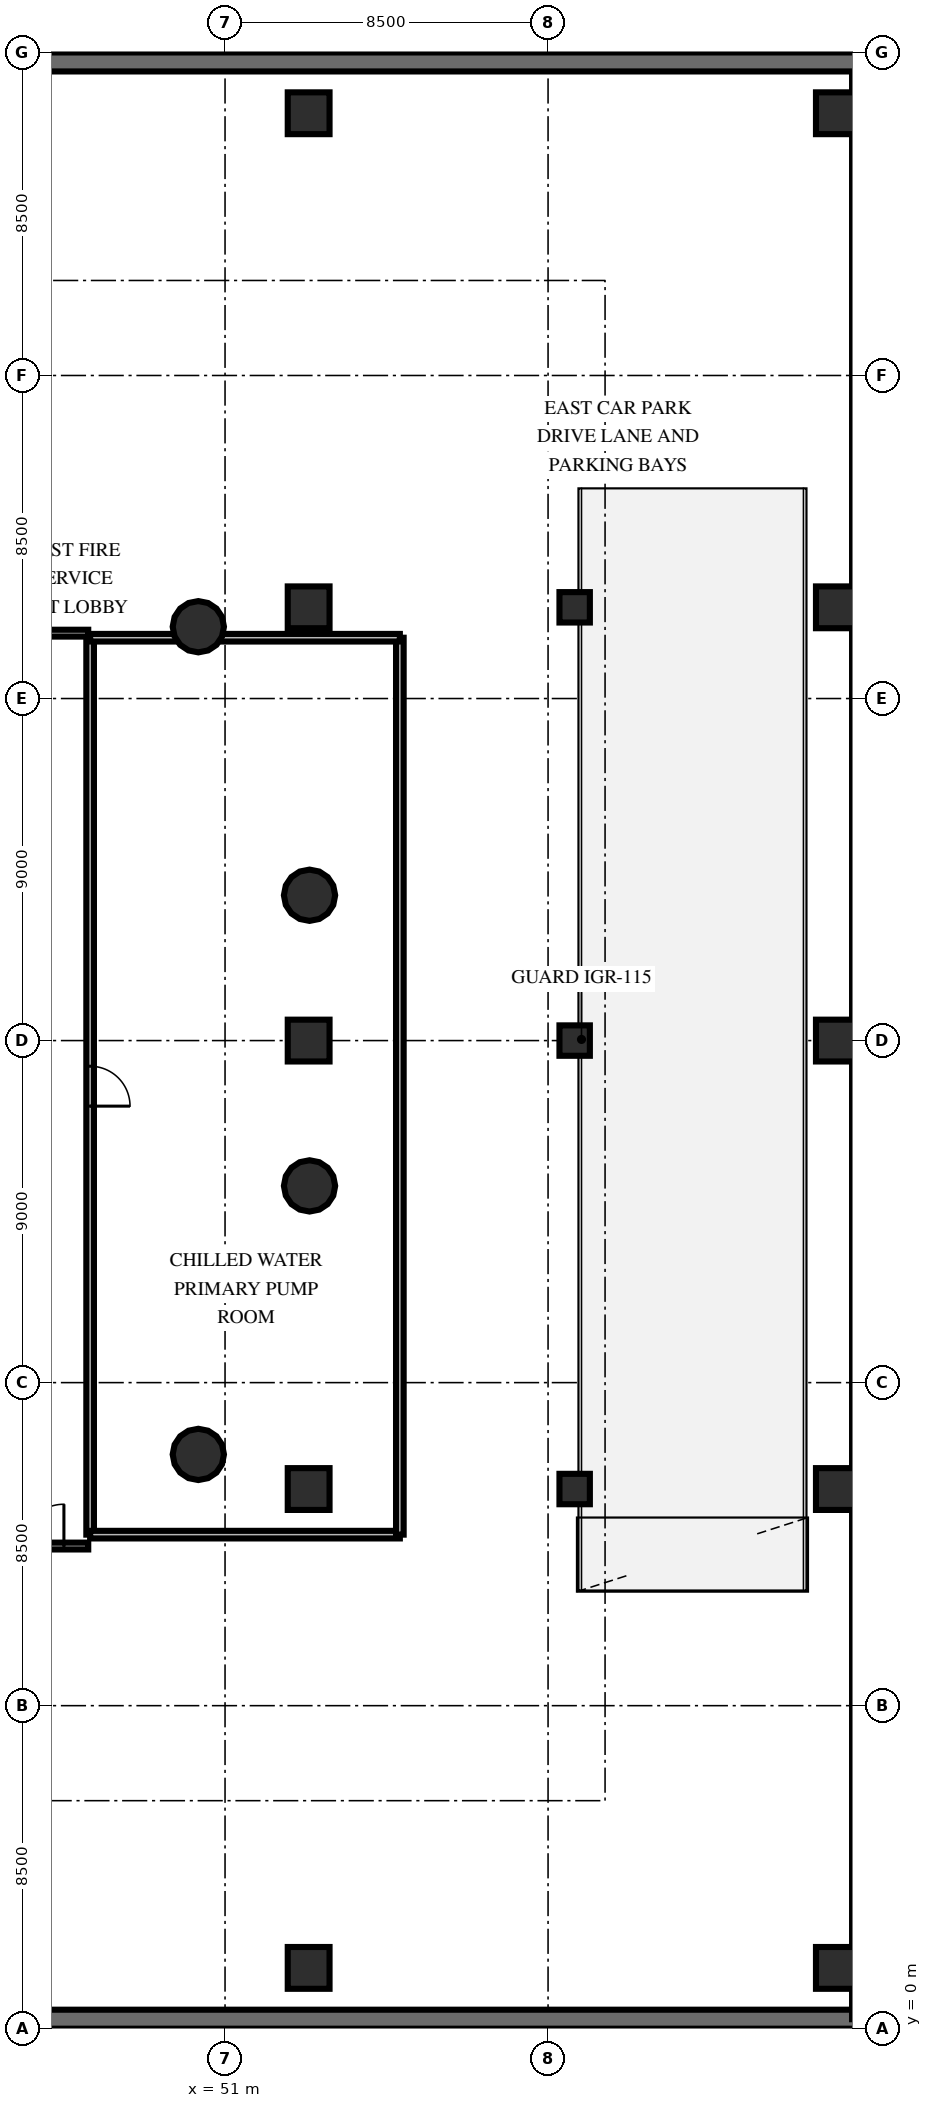
"""IFC4 building model, lengths in metres.
Left out: names, types, materials, properties, quantities, classifications, styles, units other than length and angle.
Written with IfcOpenShell. Run it as: python <this file> out.ifc"""

import sys

from ifc_helpers import new_model, si_unit, direction, frame, frame_2d, origin, origin_2d, place, context, subcontext, project, spatial, rectangle, circle, extrude, element, fill, save


model = new_model("IFC4")
c1 = context("Model", 3, precision=1e-05, world=origin(), true_north=direction((0.0, 1.0)))
c2 = subcontext(c1, "Body", "Model", "MODEL_VIEW")
j1 = project(units=[si_unit("LENGTHUNIT", "METRE"), si_unit("PLANEANGLEUNIT", "RADIAN")], contexts=[c1])
p1 = place(None, origin())
s1 = spatial("IfcSite", under=j1, at=p1, CompositionType="ELEMENT")
p2 = place(p1, origin())
s2 = spatial("IfcBuilding", under=s1, at=p2, CompositionType="ELEMENT")
p3 = place(p2, frame((0.0, 0.0, -9.6)))
s3 = spatial("IfcBuildingStorey", under=s2, at=p3, CompositionType="ELEMENT", Elevation=-9.6)
for number, where, z_axis, x_axis in (
    (1, (0.25, 0.25, 0.0), (0.0, 0.0, 1.0), (1.0, 0.0, 0.0)),
    (2, (67.75, 51.75, 0.0), (0.0, 0.0, 1.0), (-1.0, 0.0, 0.0)),
):
    element("IfcWall", number, at=place(p3, frame(where, z_axis=z_axis, x_axis=x_axis)), inside=s3, PredefinedType="SOLIDWALL", context=c2, shape_type="SweptSolid", body=[
        extrude(rectangle(XDim=67.5, YDim=0.5, at=frame_2d((33.75, 0.0))), origin(), (0.0, 0.0, 1.0), 4.8),
    ])
for number, where, z_axis, x_axis in (
    (3, (53.2, 1.6, 0.0), (0.0, 0.0, 1.0), (1.0, 0.0, 0.0)),
    (4, (53.2, 14.2, 0.0), (0.0, 0.0, 1.0), (1.0, 0.0, 0.0)),
    (5, (53.2, 26.0, 0.0), (0.0, 0.0, 1.0), (1.0, 0.0, 0.0)),
    (6, (53.2, 37.4, 0.0), (0.0, 0.0, 1.0), (1.0, 0.0, 0.0)),
    (7, (53.2, 50.4, 0.0), (0.0, 0.0, 1.0), (1.0, 0.0, 0.0)),
    (8, (67.1, 1.6, 0.0), (0.0, 0.0, 1.0), (1.0, 0.0, 0.0)),
    (9, (67.1, 14.2, 0.0), (0.0, 0.0, 1.0), (1.0, 0.0, 0.0)),
    (10, (67.1, 26.0, 0.0), (0.0, 0.0, 1.0), (1.0, 0.0, 0.0)),
    (11, (67.1, 37.4, 0.0), (0.0, 0.0, 1.0), (1.0, 0.0, 0.0)),
    (12, (67.1, 50.4, 0.0), (0.0, 0.0, 1.0), (1.0, 0.0, 0.0)),
):
    element("IfcColumn", number, at=place(p3, frame(where, z_axis=z_axis, x_axis=x_axis)), inside=s3, PredefinedType="COLUMN", context=c2, shape_type="SweptSolid", body=[
        extrude(rectangle(XDim=1.1, YDim=1.1, at=origin_2d()), origin(), (0.0, 0.0, 1.0), 4.8),
    ])
for number, where, z_axis, x_axis in (
    (13, (53.223, 29.824, 0.0), (0.0, 0.0, 1.0), (1.0, 0.0, 0.0)),
    (14, (50.297, 36.889, 0.0), (0.0, 0.0, 1.0), (1.0, 0.0, 0.0)),
    (15, (50.297, 15.111, 0.0), (0.0, 0.0, 1.0), (1.0, 0.0, 0.0)),
    (16, (53.223, 22.176, 0.0), (0.0, 0.0, 1.0), (1.0, 0.0, 0.0)),
):
    element("IfcColumn", number, at=place(p3, frame(where, z_axis=z_axis, x_axis=x_axis)), inside=s3, PredefinedType="COLUMN", context=c2, shape_type="SweptSolid", body=[
        extrude(circle(Radius=0.675, at=origin_2d()), origin(), (0.0, 0.0, 1.0), 4.8),
    ])
for number, where, z_axis, x_axis in (
    (17, (60.2, 14.2, 0.0), (0.0, 0.0, 1.0), (1.0, 0.0, 0.0)),
    (18, (60.2, 26.0, 0.0), (0.0, 0.0, 1.0), (1.0, 0.0, 0.0)),
    (19, (60.2, 37.4, 0.0), (0.0, 0.0, 1.0), (1.0, 0.0, 0.0)),
):
    element("IfcColumn", number, at=place(p3, frame(where, z_axis=z_axis, x_axis=x_axis)), inside=s3, PredefinedType="COLUMN", context=c2, shape_type="SweptSolid", body=[
        extrude(rectangle(XDim=0.8, YDim=0.8, at=origin_2d()), origin(), (0.0, 0.0, 1.0), 4.8),
    ])
p4 = place(p3, frame((11.95, 36.72, 0.0), z_axis=(0.0, 0.0, 1.0), x_axis=(1.0, 0.0, 0.0)))
e20 = element("IfcWall", 20, at=p4, inside=s3, PredefinedType="PARTITIONING", context=c2, shape_type="SweptSolid", body=[
    extrude(rectangle(XDim=35.45, YDim=0.18, at=frame_2d((17.725, 0.0))), origin(), (0.0, 0.0, 1.0), 3.56),
])
p5 = place(p4, frame((6.5, 0.0, 0.0)))
e21 = element("IfcOpeningElement", 21, at=p5, cuts=e20, PredefinedType="OPENING", context=c2, shape_type="SweptSolid", body=[
    extrude(rectangle(XDim=1.1, YDim=2.15, at=frame_2d((0.55, 1.075))), frame((0.0, 0.1, 0.0), z_axis=(0.0, -1.0, 0.0), x_axis=(1.0, 0.0, 0.0)), (0.0, 0.0, 1.0), 0.2),
])
p6 = place(p3, frame((45.01, 12.7, 0.0), z_axis=(0.0, 0.0, 1.0), x_axis=(1.0, 0.0, 0.0)))
e22 = element("IfcWall", 22, at=p6, inside=s3, PredefinedType="PARTITIONING", context=c2, shape_type="SweptSolid", body=[
    extrude(rectangle(XDim=2.39, YDim=0.18, at=frame_2d((1.195, 0.0))), origin(), (0.0, 0.0, 1.0), 3.56),
])
p7 = place(p6, frame((0.65, 0.0, 0.0)))
e23 = element("IfcOpeningElement", 23, at=p7, cuts=e22, PredefinedType="OPENING", context=c2, shape_type="SweptSolid", body=[
    extrude(rectangle(XDim=1.1, YDim=2.15, at=frame_2d((0.55, 1.075))), frame((0.0, 0.1, 0.0), z_axis=(0.0, -1.0, 0.0), x_axis=(1.0, 0.0, 0.0)), (0.0, 0.0, 1.0), 0.2),
])
p8 = place(p3, frame((47.45, 36.6, 0.0), z_axis=(0.0, 0.0, 1.0), x_axis=(0.0, -1.0, 0.0)))
e24 = element("IfcWall", 24, at=p8, inside=s3, PredefinedType="SOLIDWALL", context=c2, shape_type="SweptSolid", body=[
    extrude(rectangle(XDim=23.6, YDim=0.2, at=frame_2d((11.8, 0.0))), origin(), (0.0, 0.0, 1.0), 3.56),
])
p9 = place(p8, frame((11.275, 0.0, 0.0)))
e25 = element("IfcOpeningElement", 25, at=p9, cuts=e24, PredefinedType="OPENING", context=c2, shape_type="SweptSolid", body=[
    extrude(rectangle(XDim=1.05, YDim=2.15, at=frame_2d((0.525, 1.075))), frame((0.0, 0.11, 0.0), z_axis=(0.0, -1.0, 0.0), x_axis=(1.0, 0.0, 0.0)), (0.0, 0.0, 1.0), 0.22),
])
p10 = place(p3, frame((47.45, 13.0, 0.0), z_axis=(0.0, 0.0, 1.0), x_axis=(1.0, 0.0, 0.0)))
e26 = element("IfcWall", 26, at=p10, inside=s3, PredefinedType="SOLIDWALL", context=c2, shape_type="SweptSolid", body=[
    extrude(rectangle(XDim=8.15, YDim=0.2, at=frame_2d((4.075, 0.0))), origin(), (0.0, 0.0, 1.0), 3.56),
])
p11 = place(p3, frame((55.6, 13.0, 0.0), z_axis=(0.0, 0.0, 1.0), x_axis=(0.0, 1.0, 0.0)))
e27 = element("IfcWall", 27, at=p11, inside=s3, PredefinedType="SOLIDWALL", context=c2, shape_type="SweptSolid", body=[
    extrude(rectangle(XDim=23.6, YDim=0.2, at=frame_2d((11.8, 0.0))), origin(), (0.0, 0.0, 1.0), 3.56),
])
p12 = place(p3, frame((55.6, 36.6, 0.0), z_axis=(0.0, 0.0, 1.0), x_axis=(-1.0, 0.0, 0.0)))
e28 = element("IfcWall", 28, at=p12, inside=s3, PredefinedType="SOLIDWALL", context=c2, shape_type="SweptSolid", body=[
    extrude(rectangle(XDim=8.15, YDim=0.2, at=frame_2d((4.075, 0.0))), origin(), (0.0, 0.0, 1.0), 3.56),
])
p13 = place(p7, origin())
e29 = element("IfcDoor", 29, at=p13, inside=s3, OperationType="SINGLE_SWING_RIGHT", PredefinedType="DOOR", context=c2, shape_type="SweptSolid", body=[
    extrude(rectangle(XDim=1.1, YDim=2.15, at=frame_2d((0.55, 1.075))), frame((0.0, 0.025, 0.0), z_axis=(0.0, -1.0, 0.0), x_axis=(1.0, 0.0, 0.0)), (0.0, 0.0, 1.0), 0.05),
])
fill(e23, e29)
p14 = place(p9, origin())
e30 = element("IfcDoor", 30, at=p14, inside=s3, OperationType="SINGLE_SWING_RIGHT", PredefinedType="DOOR", context=c2, shape_type="SweptSolid", body=[
    extrude(rectangle(XDim=1.05, YDim=2.15, at=frame_2d((0.525, 1.075))), frame((0.0, 0.025, 0.0), z_axis=(0.0, -1.0, 0.0), x_axis=(1.0, 0.0, 0.0)), (0.0, 0.0, 1.0), 0.05),
])
fill(e25, e30)
save(model, sys.argv[1])
